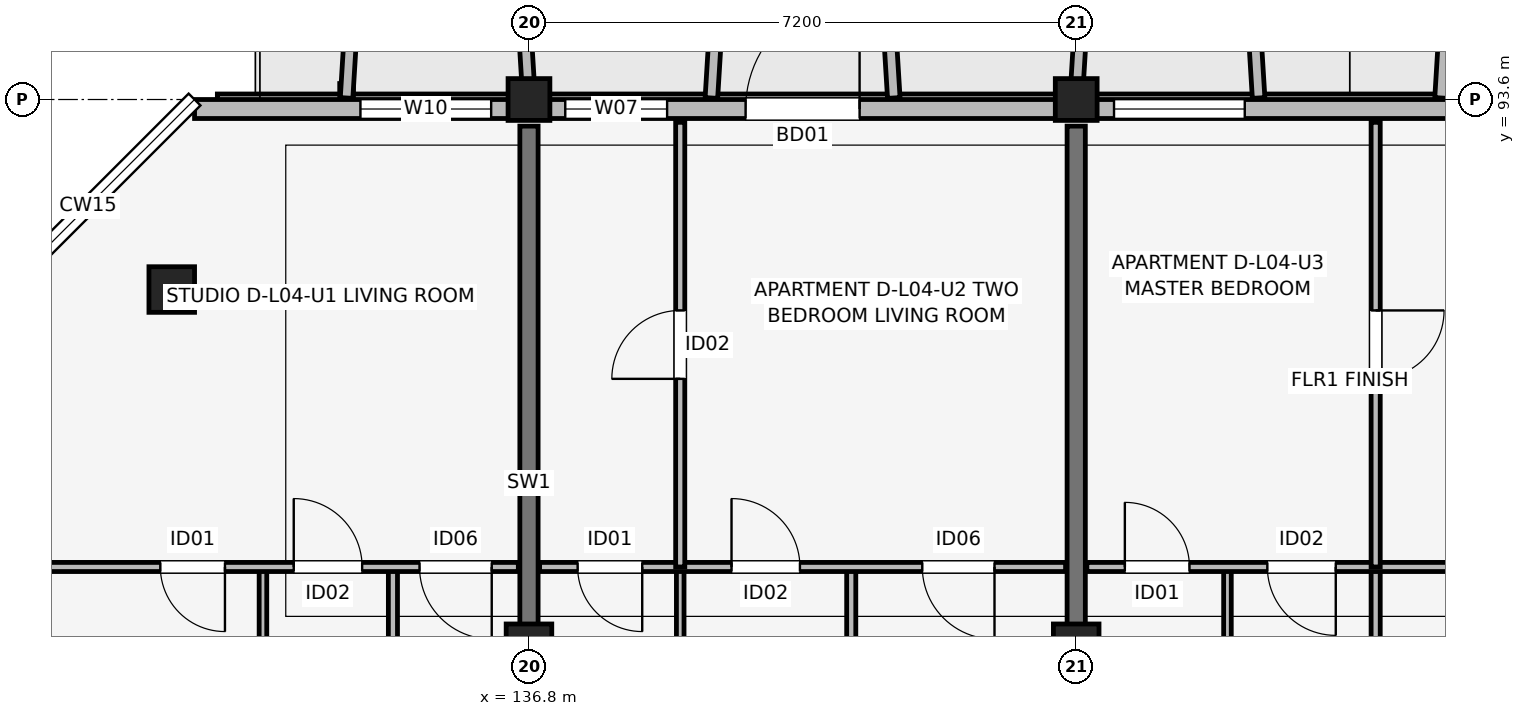
"""IFC4 building model, lengths in metres.
Left out: names, types, materials, properties, quantities, classifications, styles, units other than length and angle.
Written with IfcOpenShell. Run it as: python <this file> out.ifc"""

import sys

from ifc_helpers import new_model, si_unit, direction, frame, frame_2d, origin, origin_2d, place, context, subcontext, project, spatial, rectangle, extrude, element, fill, save


model = new_model("IFC4")
c1 = context("Model", 3, precision=1e-05, world=origin(), true_north=direction((0.0, 1.0)))
c2 = subcontext(c1, "Body", "Model", "MODEL_VIEW")
j1 = project(units=[si_unit("LENGTHUNIT", "METRE"), si_unit("PLANEANGLEUNIT", "RADIAN")], contexts=[c1])
p1 = place(None, origin())
s1 = spatial("IfcSite", under=j1, at=p1, CompositionType="ELEMENT")
p2 = place(p1, origin())
s2 = spatial("IfcBuilding", under=s1, at=p2, CompositionType="ELEMENT")
p3 = place(p2, frame((0.0, 0.0, 15.0)))
s3 = spatial("IfcBuildingStorey", under=s2, at=p3, CompositionType="ELEMENT", Elevation=15.0)
for number, where, z_axis, x_axis in (
    (1, (132.1, 91.1, 0.0), (0.0, 0.0, 1.0), (1.0, 0.0, 0.0)),
    (2, (136.8, 86.4, 0.0), (0.0, 0.0, 1.0), (1.0, 0.0, 0.0)),
):
    element("IfcColumn", number, at=place(p3, frame(where, z_axis=z_axis, x_axis=x_axis)), inside=s3, PredefinedType="COLUMN", context=c2, shape_type="SweptSolid", body=[
        extrude(rectangle(XDim=0.6, YDim=0.6, at=origin_2d()), origin(), (0.0, 0.0, 1.0), 3.15),
    ])
p4 = place(p3, frame((136.8, 93.6, 0.0), z_axis=(0.0, 0.0, 1.0), x_axis=(1.0, 0.0, 0.0)))
e3 = element("IfcColumn", 3, at=p4, inside=s3, PredefinedType="COLUMN", context=c2, shape_type="SweptSolid", body=[
    extrude(rectangle(XDim=0.55, YDim=0.55, at=origin_2d()), origin(), (0.0, 0.0, 1.0), 3.15),
])
p5 = place(p3, frame((144.0, 86.4, 0.0), z_axis=(0.0, 0.0, 1.0), x_axis=(1.0, 0.0, 0.0)))
e4 = element("IfcColumn", 4, at=p5, inside=s3, PredefinedType="COLUMN", context=c2, shape_type="SweptSolid", body=[
    extrude(rectangle(XDim=0.6, YDim=0.6, at=origin_2d()), origin(), (0.0, 0.0, 1.0), 3.15),
])
p6 = place(p3, frame((144.0, 93.6, 0.0), z_axis=(0.0, 0.0, 1.0), x_axis=(1.0, 0.0, 0.0)))
e5 = element("IfcColumn", 5, at=p6, inside=s3, PredefinedType="COLUMN", context=c2, shape_type="SweptSolid", body=[
    extrude(rectangle(XDim=0.55, YDim=0.55, at=origin_2d()), origin(), (0.0, 0.0, 1.0), 3.15),
])
for number, where, z_axis, x_axis in (
    (6, (136.8, 83.85, 0.0), (0.0, 0.0, 1.0), (0.0, 1.0, 0.0)),
    (7, (144.0, 83.85, 0.0), (0.0, 0.0, 1.0), (0.0, 1.0, 0.0)),
):
    element("IfcWall", number, at=place(p3, frame(where, z_axis=z_axis, x_axis=x_axis)), inside=s3, PredefinedType="SHEAR", context=c2, shape_type="SweptSolid", body=[
        extrude(rectangle(XDim=9.4, YDim=0.24, at=frame_2d((4.7, 0.0))), origin(), (0.0, 0.0, 1.0), 3.15),
    ])
p7 = place(p3, frame((162.8, 93.475, 0.0), z_axis=(0.0, 0.0, 1.0), x_axis=(-1.0, 0.0, 0.0)))
e8 = element("IfcWall", 8, at=p7, inside=s3, PredefinedType="SOLIDWALL", context=c2, shape_type="SweptSolid", body=[
    extrude(rectangle(XDim=30.4, YDim=0.25, at=frame_2d((15.2, 0.0))), origin(), (0.0, 0.0, 1.0), 2.43),
])
p8 = place(p7, frame((23.15, 0.0, 0.0), z_axis=(0.0, 0.0, 1.0), x_axis=(-1.0, 0.0, 0.0)))
e9 = element("IfcOpeningElement", 9, at=p8, cuts=e8, PredefinedType="OPENING", context=c2, shape_type="SweptSolid", body=[
    extrude(rectangle(XDim=1.5, YDim=2.15, at=frame_2d((0.75, 1.075))), frame((0.0, 0.135, 0.0), z_axis=(0.0, -1.0, 0.0), x_axis=(1.0, 0.0, 0.0)), (0.0, 0.0, 1.0), 0.27),
])
p9 = place(p7, frame((8.9, 0.0, 0.0), z_axis=(0.0, 0.0, 1.0), x_axis=(-1.0, 0.0, 0.0)))
e10 = element("IfcOpeningElement", 10, at=p9, cuts=e8, PredefinedType="OPENING", context=c2, shape_type="SweptSolid", body=[
    extrude(rectangle(XDim=1.8, YDim=2.15, at=frame_2d((0.9, 1.075))), frame((0.0, 0.135, 0.0), z_axis=(0.0, -1.0, 0.0), x_axis=(1.0, 0.0, 0.0)), (0.0, 0.0, 1.0), 0.27),
])
p10 = place(p7, frame((26.498, 0.0, 0.7)))
e11 = element("IfcOpeningElement", 11, at=p10, cuts=e8, PredefinedType="OPENING", context=c2, shape_type="SweptSolid", body=[
    extrude(rectangle(XDim=1.72, YDim=1.6, at=frame_2d((0.86, 0.8))), frame((0.0, 0.135, 0.0), z_axis=(0.0, -1.0, 0.0), x_axis=(1.0, 0.0, 0.0)), (0.0, 0.0, 1.0), 0.27),
])
p11 = place(p7, frame((24.183, 0.0, 0.75)))
e12 = element("IfcOpeningElement", 12, at=p11, cuts=e8, PredefinedType="OPENING", context=c2, shape_type="SweptSolid", body=[
    extrude(rectangle(XDim=1.34, YDim=1.55, at=frame_2d((0.67, 0.775))), frame((0.0, 0.135, 0.0), z_axis=(0.0, -1.0, 0.0), x_axis=(1.0, 0.0, 0.0)), (0.0, 0.0, 1.0), 0.27),
])
p12 = place(p7, frame((16.583, 0.0, 0.7)))
e13 = element("IfcOpeningElement", 13, at=p12, cuts=e8, PredefinedType="OPENING", context=c2, shape_type="SweptSolid", body=[
    extrude(rectangle(XDim=1.72, YDim=1.6, at=frame_2d((0.86, 0.8))), frame((0.0, 0.135, 0.0), z_axis=(0.0, -1.0, 0.0), x_axis=(1.0, 0.0, 0.0)), (0.0, 0.0, 1.0), 0.27),
])
p13 = place(p7, frame((12.597, 0.0, 0.75)))
e14 = element("IfcOpeningElement", 14, at=p13, cuts=e8, PredefinedType="OPENING", context=c2, shape_type="SweptSolid", body=[
    extrude(rectangle(XDim=0.72, YDim=1.35, at=frame_2d((0.36, 0.675))), frame((0.0, 0.135, 0.0), z_axis=(0.0, -1.0, 0.0), x_axis=(1.0, 0.0, 0.0)), (0.0, 0.0, 1.0), 0.27),
])
p14 = place(p7, frame((10.028, 0.0, 0.75)))
e15 = element("IfcOpeningElement", 15, at=p14, cuts=e8, PredefinedType="OPENING", context=c2, shape_type="SweptSolid", body=[
    extrude(rectangle(XDim=0.85, YDim=1.4, at=frame_2d((0.425, 0.7))), frame((0.0, 0.135, 0.0), z_axis=(0.0, -1.0, 0.0), x_axis=(1.0, 0.0, 0.0)), (0.0, 0.0, 1.0), 0.27),
])
p15 = place(p7, frame((2.762, 0.0, 0.75)))
e16 = element("IfcOpeningElement", 16, at=p15, cuts=e8, PredefinedType="OPENING", context=c2, shape_type="SweptSolid", body=[
    extrude(rectangle(XDim=0.98, YDim=1.45, at=frame_2d((0.49, 0.725))), frame((0.0, 0.135, 0.0), z_axis=(0.0, -1.0, 0.0), x_axis=(1.0, 0.0, 0.0)), (0.0, 0.0, 1.0), 0.27),
])
p16 = place(p7, frame((0.535, 0.0, 0.75)))
e17 = element("IfcOpeningElement", 17, at=p16, cuts=e8, PredefinedType="OPENING", context=c2, shape_type="SweptSolid", body=[
    extrude(rectangle(XDim=1.1, YDim=1.5, at=frame_2d((0.55, 0.75))), frame((0.0, 0.135, 0.0), z_axis=(0.0, -1.0, 0.0), x_axis=(1.0, 0.0, 0.0)), (0.0, 0.0, 1.0), 0.27),
])
for number, where, z_axis, x_axis in (
    (18, (134.4, 93.62, 0.0), (0.0, 0.0, 1.0), (0.061, 0.998, 0.0)),
    (19, (136.8, 93.62, 0.0), (0.0, 0.0, 1.0), (-0.061, 0.998, 0.0)),
):
    element("IfcWall", number, at=place(p3, frame(where, z_axis=z_axis, x_axis=x_axis)), inside=s3, PredefinedType="ELEMENTEDWALL", context=c2, shape_type="SweptSolid", body=[
        extrude(rectangle(XDim=1.964, YDim=0.165, at=frame_2d((0.982, 0.0))), origin(), (0.0, 0.0, 1.0), 2.95),
    ])
for number, where, z_axis, x_axis in (
    (20, (139.2, 93.62, 0.0), (0.0, 0.0, 1.0), (0.061, 0.998, 0.0)),
    (21, (141.6, 93.62, 0.0), (0.0, 0.0, 1.0), (-0.061, 0.998, 0.0)),
):
    element("IfcWall", number, at=place(p3, frame(where, z_axis=z_axis, x_axis=x_axis)), inside=s3, PredefinedType="ELEMENTEDWALL", context=c2, shape_type="SweptSolid", body=[
        extrude(rectangle(XDim=1.964, YDim=0.165, at=frame_2d((0.982, 0.0))), origin(), (0.0, 0.0, 1.0), 2.53),
    ])
p17 = place(p3, frame((144.0, 93.62, 0.0), z_axis=(0.0, 0.0, 1.0), x_axis=(0.061170732449, 0.998127317276, 0.0)))
e22 = element("IfcWall", 22, at=p17, inside=s3, PredefinedType="ELEMENTEDWALL", context=c2, shape_type="SweptSolid", body=[
    extrude(rectangle(XDim=1.964, YDim=0.165, at=frame_2d((0.982, 0.0))), origin(), (0.0, 0.0, 1.0), 2.95),
])
for number, where, z_axis, x_axis in (
    (23, (146.4, 93.62, 0.0), (0.0, 0.0, 1.0), (-0.061, 0.998, 0.0)),
    (24, (148.8, 93.62, 0.0), (0.0, 0.0, 1.0), (0.061, 0.998, 0.0)),
):
    element("IfcWall", number, at=place(p3, frame(where, z_axis=z_axis, x_axis=x_axis)), inside=s3, PredefinedType="ELEMENTEDWALL", context=c2, shape_type="SweptSolid", body=[
        extrude(rectangle(XDim=1.964, YDim=0.165, at=frame_2d((0.982, 0.0))), origin(), (0.0, 0.0, 1.0), 2.58),
    ])
p18 = place(p3, frame((133.3, 83.7, 0.0), z_axis=(0.0, 0.0, 1.0), x_axis=(0.0, 1.0, 0.0)))
e25 = element("IfcWall", 25, at=p18, inside=s3, PredefinedType="PARTITIONING", context=c2, shape_type="SweptSolid", body=[
    extrude(rectangle(XDim=3.75, YDim=0.1, at=frame_2d((1.875, 0.0))), origin(), (0.0, 0.0, 1.0), 2.375),
])
p19 = place(p3, frame((135.01, 83.7, 0.0), z_axis=(0.0, 0.0, 1.0), x_axis=(0.0, 1.0, 0.0)))
e26 = element("IfcWall", 26, at=p19, inside=s3, PredefinedType="PARTITIONING", context=c2, shape_type="SweptSolid", body=[
    extrude(rectangle(XDim=3.75, YDim=0.12, at=frame_2d((1.875, 0.0))), origin(), (0.0, 0.0, 1.0), 2.375),
])
p20 = place(p3, frame((129.74, 87.45, 0.0), z_axis=(0.0, 0.0, 1.0), x_axis=(1.0, 0.0, 0.0)))
e27 = element("IfcWall", 27, at=p20, inside=s3, PredefinedType="PARTITIONING", context=c2, shape_type="SweptSolid", body=[
    extrude(rectangle(XDim=6.92, YDim=0.12, at=frame_2d((3.46, 0.0))), origin(), (0.0, 0.0, 1.0), 2.38),
])
p21 = place(p20, frame((3.06, 0.0, 0.0), z_axis=(0.0, 0.0, 1.0), x_axis=(-1.0, 0.0, 0.0)))
e28 = element("IfcOpeningElement", 28, at=p21, cuts=e27, PredefinedType="OPENING", context=c2, shape_type="SweptSolid", body=[
    extrude(rectangle(XDim=0.85, YDim=2.08, at=frame_2d((0.425, 1.04))), frame((0.0, 0.07, 0.0), z_axis=(0.0, -1.0, 0.0), x_axis=(1.0, 0.0, 0.0)), (0.0, 0.0, 1.0), 0.14),
])
p22 = place(p20, frame((3.965, 0.0, 0.0)))
e29 = element("IfcOpeningElement", 29, at=p22, cuts=e27, PredefinedType="OPENING", context=c2, shape_type="SweptSolid", body=[
    extrude(rectangle(XDim=0.9, YDim=2.08, at=frame_2d((0.45, 1.04))), frame((0.0, 0.07, 0.0), z_axis=(0.0, -1.0, 0.0), x_axis=(1.0, 0.0, 0.0)), (0.0, 0.0, 1.0), 0.14),
])
p23 = place(p20, frame((6.57, 0.0, 0.0), z_axis=(0.0, 0.0, 1.0), x_axis=(-1.0, 0.0, 0.0)))
e30 = element("IfcOpeningElement", 30, at=p23, cuts=e27, PredefinedType="OPENING", context=c2, shape_type="SweptSolid", body=[
    extrude(rectangle(XDim=0.95, YDim=2.08, at=frame_2d((0.475, 1.04))), frame((0.0, 0.07, 0.0), z_axis=(0.0, -1.0, 0.0), x_axis=(1.0, 0.0, 0.0)), (0.0, 0.0, 1.0), 0.14),
])
p24 = place(p3, frame((138.79, 83.7, 0.0), z_axis=(0.0, 0.0, 1.0), x_axis=(0.0, 1.0, 0.0)))
e31 = element("IfcWall", 31, at=p24, inside=s3, PredefinedType="PARTITIONING", context=c2, shape_type="SweptSolid", body=[
    extrude(rectangle(XDim=3.75, YDim=0.1, at=frame_2d((1.875, 0.0))), origin(), (0.0, 0.0, 1.0), 2.375),
])
p25 = place(p3, frame((141.04, 83.7, 0.0), z_axis=(0.0, 0.0, 1.0), x_axis=(0.0, 1.0, 0.0)))
e32 = element("IfcWall", 32, at=p25, inside=s3, PredefinedType="PARTITIONING", context=c2, shape_type="SweptSolid", body=[
    extrude(rectangle(XDim=3.75, YDim=0.12, at=frame_2d((1.875, 0.0))), origin(), (0.0, 0.0, 1.0), 2.375),
])
p26 = place(p3, frame((136.94, 87.45, 0.0), z_axis=(0.0, 0.0, 1.0), x_axis=(1.0, 0.0, 0.0)))
e33 = element("IfcWall", 33, at=p26, inside=s3, PredefinedType="PARTITIONING", context=c2, shape_type="SweptSolid", body=[
    extrude(rectangle(XDim=6.92, YDim=0.12, at=frame_2d((3.46, 0.0))), origin(), (0.0, 0.0, 1.0), 2.38),
])
p27 = place(p26, frame((1.35, 0.0, 0.0), z_axis=(0.0, 0.0, 1.0), x_axis=(-1.0, 0.0, 0.0)))
e34 = element("IfcOpeningElement", 34, at=p27, cuts=e33, PredefinedType="OPENING", context=c2, shape_type="SweptSolid", body=[
    extrude(rectangle(XDim=0.85, YDim=2.08, at=frame_2d((0.425, 1.04))), frame((0.0, 0.07, 0.0), z_axis=(0.0, -1.0, 0.0), x_axis=(1.0, 0.0, 0.0)), (0.0, 0.0, 1.0), 0.14),
])
p28 = place(p26, frame((2.525, 0.0, 0.0)))
e35 = element("IfcOpeningElement", 35, at=p28, cuts=e33, PredefinedType="OPENING", context=c2, shape_type="SweptSolid", body=[
    extrude(rectangle(XDim=0.9, YDim=2.08, at=frame_2d((0.45, 1.04))), frame((0.0, 0.07, 0.0), z_axis=(0.0, -1.0, 0.0), x_axis=(1.0, 0.0, 0.0)), (0.0, 0.0, 1.0), 0.14),
])
p29 = place(p26, frame((5.985, 0.0, 0.0), z_axis=(0.0, 0.0, 1.0), x_axis=(-1.0, 0.0, 0.0)))
e36 = element("IfcOpeningElement", 36, at=p29, cuts=e33, PredefinedType="OPENING", context=c2, shape_type="SweptSolid", body=[
    extrude(rectangle(XDim=0.95, YDim=2.08, at=frame_2d((0.475, 1.04))), frame((0.0, 0.07, 0.0), z_axis=(0.0, -1.0, 0.0), x_axis=(1.0, 0.0, 0.0)), (0.0, 0.0, 1.0), 0.14),
])
p30 = place(p3, frame((138.79, 87.45, 0.0), z_axis=(0.0, 0.0, 1.0), x_axis=(0.0, 1.0, 0.0)))
e37 = element("IfcWall", 37, at=p30, inside=s3, PredefinedType="PARTITIONING", context=c2, shape_type="SweptSolid", body=[
    extrude(rectangle(XDim=5.85, YDim=0.12, at=frame_2d((2.925, 0.0))), origin(), (0.0, 0.0, 1.0), 2.38),
])
p31 = place(p30, frame((2.475, 0.0, 0.0)))
e38 = element("IfcOpeningElement", 38, at=p31, cuts=e37, PredefinedType="OPENING", context=c2, shape_type="SweptSolid", body=[
    extrude(rectangle(XDim=0.9, YDim=2.08, at=frame_2d((0.45, 1.04))), frame((0.0, 0.07, 0.0), z_axis=(0.0, -1.0, 0.0), x_axis=(1.0, 0.0, 0.0)), (0.0, 0.0, 1.0), 0.14),
])
p32 = place(p3, frame((145.99, 83.7, 0.0), z_axis=(0.0, 0.0, 1.0), x_axis=(0.0, 1.0, 0.0)))
e39 = element("IfcWall", 39, at=p32, inside=s3, PredefinedType="PARTITIONING", context=c2, shape_type="SweptSolid", body=[
    extrude(rectangle(XDim=3.75, YDim=0.1, at=frame_2d((1.875, 0.0))), origin(), (0.0, 0.0, 1.0), 2.375),
])
p33 = place(p3, frame((147.94, 83.7, 0.0), z_axis=(0.0, 0.0, 1.0), x_axis=(0.0, 1.0, 0.0)))
e40 = element("IfcWall", 40, at=p33, inside=s3, PredefinedType="PARTITIONING", context=c2, shape_type="SweptSolid", body=[
    extrude(rectangle(XDim=3.75, YDim=0.12, at=frame_2d((1.875, 0.0))), origin(), (0.0, 0.0, 1.0), 2.375),
])
p34 = place(p3, frame((144.14, 87.45, 0.0), z_axis=(0.0, 0.0, 1.0), x_axis=(1.0, 0.0, 0.0)))
e41 = element("IfcWall", 41, at=p34, inside=s3, PredefinedType="PARTITIONING", context=c2, shape_type="SweptSolid", body=[
    extrude(rectangle(XDim=6.92, YDim=0.12, at=frame_2d((3.46, 0.0))), origin(), (0.0, 0.0, 1.0), 2.38),
])
p35 = place(p34, frame((0.5, 0.0, 0.0)))
e42 = element("IfcOpeningElement", 42, at=p35, cuts=e41, PredefinedType="OPENING", context=c2, shape_type="SweptSolid", body=[
    extrude(rectangle(XDim=0.85, YDim=2.08, at=frame_2d((0.425, 1.04))), frame((0.0, 0.07, 0.0), z_axis=(0.0, -1.0, 0.0), x_axis=(1.0, 0.0, 0.0)), (0.0, 0.0, 1.0), 0.14),
])
p36 = place(p34, frame((3.275, 0.0, 0.0), z_axis=(0.0, 0.0, 1.0), x_axis=(-1.0, 0.0, 0.0)))
e43 = element("IfcOpeningElement", 43, at=p36, cuts=e41, PredefinedType="OPENING", context=c2, shape_type="SweptSolid", body=[
    extrude(rectangle(XDim=0.9, YDim=2.08, at=frame_2d((0.45, 1.04))), frame((0.0, 0.07, 0.0), z_axis=(0.0, -1.0, 0.0), x_axis=(1.0, 0.0, 0.0)), (0.0, 0.0, 1.0), 0.14),
])
p37 = place(p34, frame((4.885, 0.0, 0.0)))
e44 = element("IfcOpeningElement", 44, at=p37, cuts=e41, PredefinedType="OPENING", context=c2, shape_type="SweptSolid", body=[
    extrude(rectangle(XDim=0.95, YDim=2.08, at=frame_2d((0.475, 1.04))), frame((0.0, 0.07, 0.0), z_axis=(0.0, -1.0, 0.0), x_axis=(1.0, 0.0, 0.0)), (0.0, 0.0, 1.0), 0.14),
])
p38 = place(p3, frame((147.94, 87.45, 0.0), z_axis=(0.0, 0.0, 1.0), x_axis=(0.0, 1.0, 0.0)))
e45 = element("IfcWall", 45, at=p38, inside=s3, PredefinedType="PARTITIONING", context=c2, shape_type="SweptSolid", body=[
    extrude(rectangle(XDim=5.85, YDim=0.12, at=frame_2d((2.925, 0.0))), origin(), (0.0, 0.0, 1.0), 2.38),
])
p39 = place(p38, frame((3.375, 0.0, 0.0), z_axis=(0.0, 0.0, 1.0), x_axis=(-1.0, 0.0, 0.0)))
e46 = element("IfcOpeningElement", 46, at=p39, cuts=e45, PredefinedType="OPENING", context=c2, shape_type="SweptSolid", body=[
    extrude(rectangle(XDim=0.9, YDim=2.08, at=frame_2d((0.45, 1.04))), frame((0.0, 0.07, 0.0), z_axis=(0.0, -1.0, 0.0), x_axis=(1.0, 0.0, 0.0)), (0.0, 0.0, 1.0), 0.14),
])
p40 = place(p8, origin())
e47 = element("IfcDoor", 47, at=p40, inside=s3, OperationType="SINGLE_SWING_LEFT", PredefinedType="DOOR", context=c2, shape_type="SweptSolid", body=[
    extrude(rectangle(XDim=1.5, YDim=2.15, at=frame_2d((0.75, 1.075))), frame((0.0, 0.025, 0.0), z_axis=(0.0, -1.0, 0.0), x_axis=(1.0, 0.0, 0.0)), (0.0, 0.0, 1.0), 0.05),
])
fill(e9, e47)
p41 = place(p10, origin())
e48 = element("IfcWindow", 48, at=p41, inside=s3, PartitioningType="SINGLE_PANEL", PredefinedType="WINDOW", context=c2, shape_type="SweptSolid", body=[
    extrude(rectangle(XDim=1.72, YDim=1.6, at=frame_2d((0.86, 0.8))), frame((0.0, 0.03, 0.0), z_axis=(0.0, -1.0, 0.0), x_axis=(1.0, 0.0, 0.0)), (0.0, 0.0, 1.0), 0.06),
])
fill(e11, e48)
p42 = place(p11, origin())
e49 = element("IfcWindow", 49, at=p42, inside=s3, PartitioningType="SINGLE_PANEL", PredefinedType="WINDOW", context=c2, shape_type="SweptSolid", body=[
    extrude(rectangle(XDim=1.34, YDim=1.55, at=frame_2d((0.67, 0.775))), frame((0.0, 0.03, 0.0), z_axis=(0.0, -1.0, 0.0), x_axis=(1.0, 0.0, 0.0)), (0.0, 0.0, 1.0), 0.06),
])
fill(e12, e49)
p43 = place(p12, origin())
e50 = element("IfcWindow", 50, at=p43, inside=s3, PartitioningType="SINGLE_PANEL", PredefinedType="WINDOW", context=c2, shape_type="SweptSolid", body=[
    extrude(rectangle(XDim=1.72, YDim=1.6, at=frame_2d((0.86, 0.8))), frame((0.0, 0.03, 0.0), z_axis=(0.0, -1.0, 0.0), x_axis=(1.0, 0.0, 0.0)), (0.0, 0.0, 1.0), 0.06),
])
fill(e13, e50)
p44 = place(p21, origin())
e51 = element("IfcDoor", 51, at=p44, inside=s3, OperationType="SINGLE_SWING_RIGHT", PredefinedType="DOOR", context=c2, shape_type="SweptSolid", body=[
    extrude(rectangle(XDim=0.85, YDim=2.08, at=frame_2d((0.425, 1.04))), frame((0.0, 0.025, 0.0), z_axis=(0.0, -1.0, 0.0), x_axis=(1.0, 0.0, 0.0)), (0.0, 0.0, 1.0), 0.05),
])
fill(e28, e51)
p45 = place(p22, origin())
e52 = element("IfcDoor", 52, at=p45, inside=s3, OperationType="SINGLE_SWING_LEFT", PredefinedType="DOOR", context=c2, shape_type="SweptSolid", body=[
    extrude(rectangle(XDim=0.9, YDim=2.08, at=frame_2d((0.45, 1.04))), frame((0.0, 0.025, 0.0), z_axis=(0.0, -1.0, 0.0), x_axis=(1.0, 0.0, 0.0)), (0.0, 0.0, 1.0), 0.05),
])
fill(e29, e52)
p46 = place(p23, origin())
e53 = element("IfcDoor", 53, at=p46, inside=s3, OperationType="SINGLE_SWING_RIGHT", PredefinedType="DOOR", context=c2, shape_type="SweptSolid", body=[
    extrude(rectangle(XDim=0.95, YDim=2.08, at=frame_2d((0.475, 1.04))), frame((0.0, 0.025, 0.0), z_axis=(0.0, -1.0, 0.0), x_axis=(1.0, 0.0, 0.0)), (0.0, 0.0, 1.0), 0.05),
])
fill(e30, e53)
p47 = place(p27, origin())
e54 = element("IfcDoor", 54, at=p47, inside=s3, OperationType="SINGLE_SWING_RIGHT", PredefinedType="DOOR", context=c2, shape_type="SweptSolid", body=[
    extrude(rectangle(XDim=0.85, YDim=2.08, at=frame_2d((0.425, 1.04))), frame((0.0, 0.025, 0.0), z_axis=(0.0, -1.0, 0.0), x_axis=(1.0, 0.0, 0.0)), (0.0, 0.0, 1.0), 0.05),
])
fill(e34, e54)
p48 = place(p28, origin())
e55 = element("IfcDoor", 55, at=p48, inside=s3, OperationType="SINGLE_SWING_LEFT", PredefinedType="DOOR", context=c2, shape_type="SweptSolid", body=[
    extrude(rectangle(XDim=0.9, YDim=2.08, at=frame_2d((0.45, 1.04))), frame((0.0, 0.025, 0.0), z_axis=(0.0, -1.0, 0.0), x_axis=(1.0, 0.0, 0.0)), (0.0, 0.0, 1.0), 0.05),
])
fill(e35, e55)
p49 = place(p29, origin())
e56 = element("IfcDoor", 56, at=p49, inside=s3, OperationType="SINGLE_SWING_RIGHT", PredefinedType="DOOR", context=c2, shape_type="SweptSolid", body=[
    extrude(rectangle(XDim=0.95, YDim=2.08, at=frame_2d((0.475, 1.04))), frame((0.0, 0.025, 0.0), z_axis=(0.0, -1.0, 0.0), x_axis=(1.0, 0.0, 0.0)), (0.0, 0.0, 1.0), 0.05),
])
fill(e36, e56)
p50 = place(p31, origin())
e57 = element("IfcDoor", 57, at=p50, inside=s3, OperationType="SINGLE_SWING_LEFT", PredefinedType="DOOR", context=c2, shape_type="SweptSolid", body=[
    extrude(rectangle(XDim=0.9, YDim=2.08, at=frame_2d((0.45, 1.04))), frame((0.0, 0.025, 0.0), z_axis=(0.0, -1.0, 0.0), x_axis=(1.0, 0.0, 0.0)), (0.0, 0.0, 1.0), 0.05),
])
fill(e38, e57)
p51 = place(p35, origin())
e58 = element("IfcDoor", 58, at=p51, inside=s3, OperationType="SINGLE_SWING_LEFT", PredefinedType="DOOR", context=c2, shape_type="SweptSolid", body=[
    extrude(rectangle(XDim=0.85, YDim=2.08, at=frame_2d((0.425, 1.04))), frame((0.0, 0.025, 0.0), z_axis=(0.0, -1.0, 0.0), x_axis=(1.0, 0.0, 0.0)), (0.0, 0.0, 1.0), 0.05),
])
fill(e42, e58)
p52 = place(p36, origin())
e59 = element("IfcDoor", 59, at=p52, inside=s3, OperationType="SINGLE_SWING_RIGHT", PredefinedType="DOOR", context=c2, shape_type="SweptSolid", body=[
    extrude(rectangle(XDim=0.9, YDim=2.08, at=frame_2d((0.45, 1.04))), frame((0.0, 0.025, 0.0), z_axis=(0.0, -1.0, 0.0), x_axis=(1.0, 0.0, 0.0)), (0.0, 0.0, 1.0), 0.05),
])
fill(e43, e59)
p53 = place(p39, origin())
e60 = element("IfcDoor", 60, at=p53, inside=s3, OperationType="SINGLE_SWING_RIGHT", PredefinedType="DOOR", context=c2, shape_type="SweptSolid", body=[
    extrude(rectangle(XDim=0.9, YDim=2.08, at=frame_2d((0.45, 1.04))), frame((0.0, 0.025, 0.0), z_axis=(0.0, -1.0, 0.0), x_axis=(1.0, 0.0, 0.0)), (0.0, 0.0, 1.0), 0.05),
])
fill(e46, e60)
save(model, sys.argv[1])
